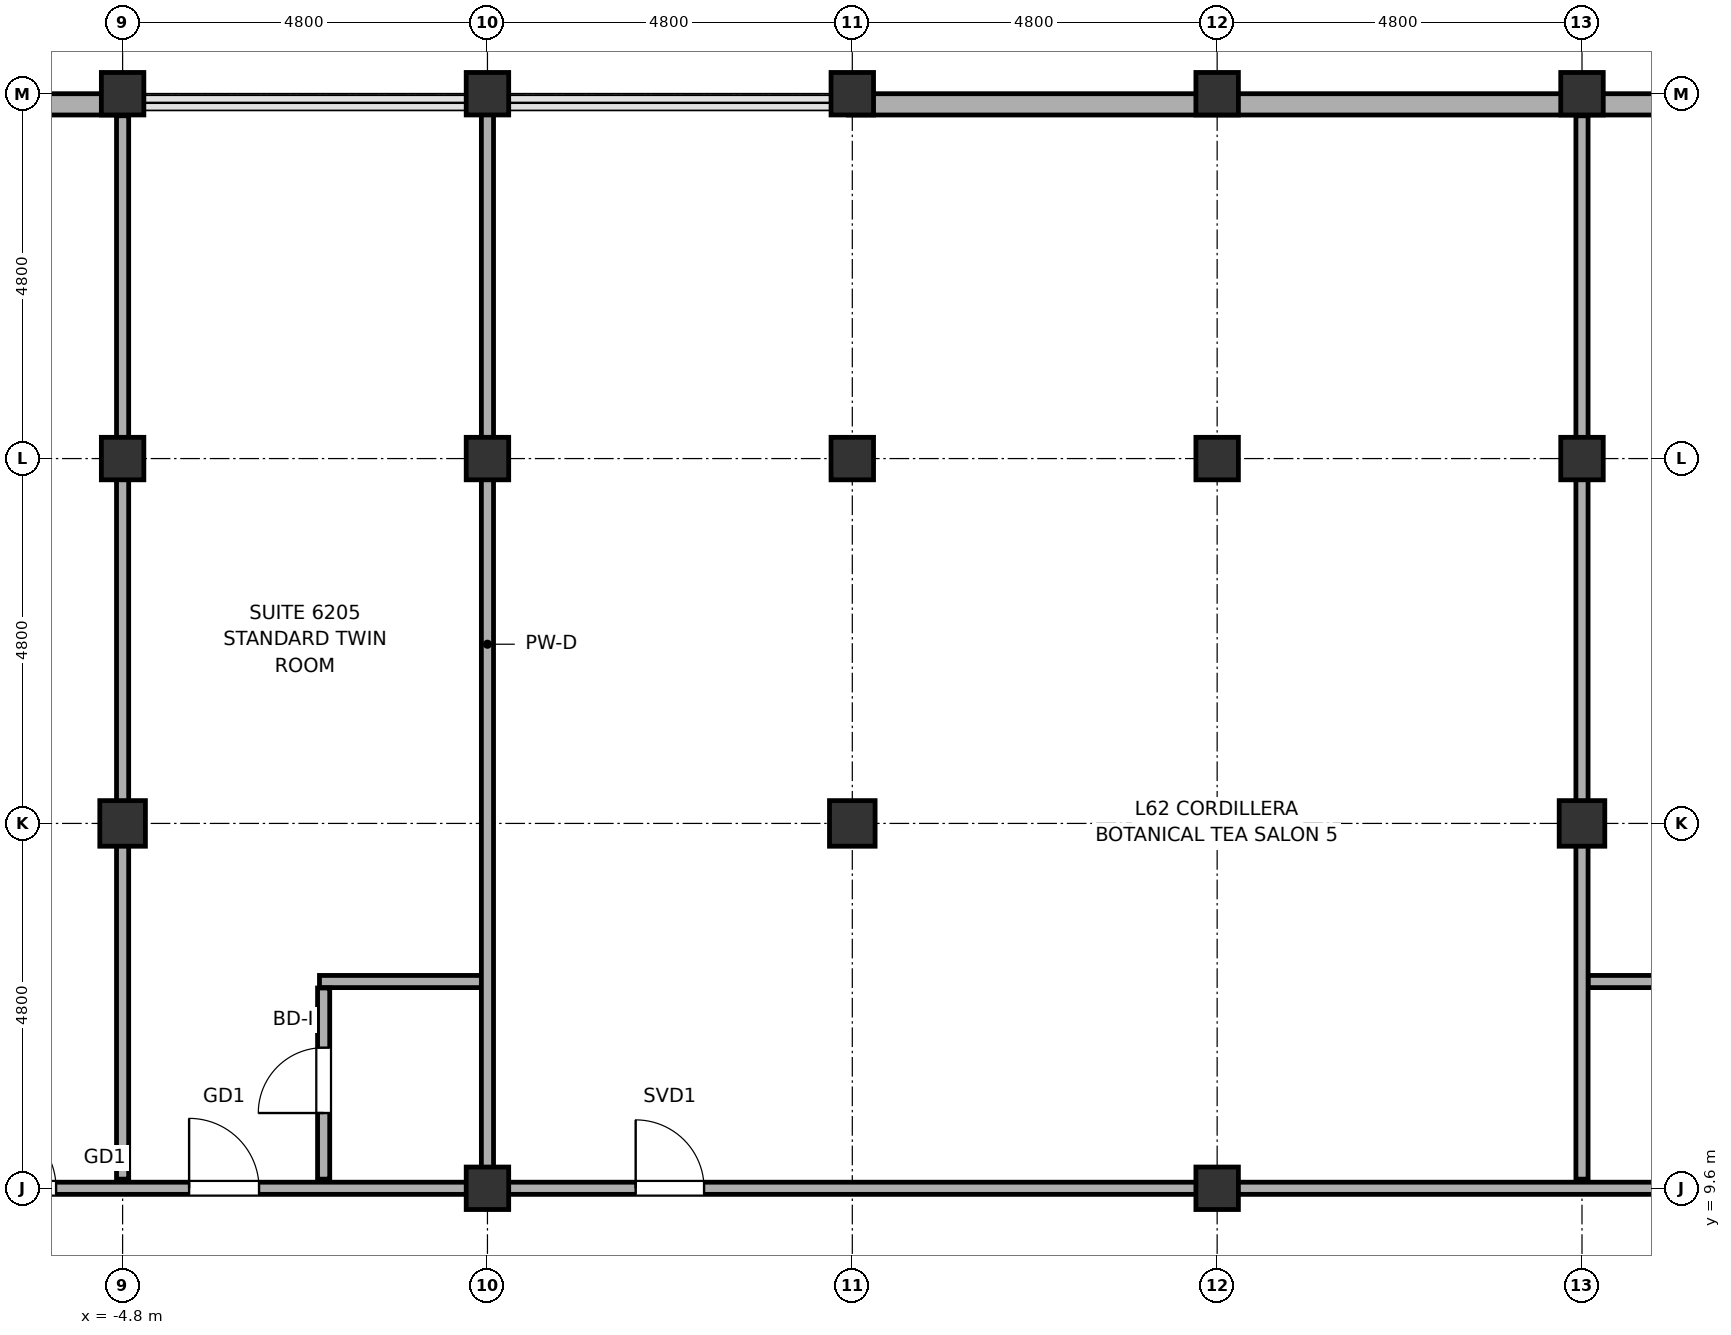
"""IFC4 building model, lengths in metres.
Left out: names, types, materials, properties, quantities, classifications, styles, units other than length and angle.
Written with IfcOpenShell. Run it as: python <this file> out.ifc"""

import sys

from ifc_helpers import new_model, si_unit, direction, frame, frame_2d, origin, origin_2d, place, context, subcontext, project, spatial, rectangle, hollow_rectangle, hollow_circle, extrude, element, fill, save


model = new_model("IFC4")
c1 = context("Model", 3, precision=1e-05, world=origin(), true_north=direction((0.0, 1.0)))
c2 = subcontext(c1, "Body", "Model", "MODEL_VIEW")
j1 = project(units=[si_unit("LENGTHUNIT", "METRE"), si_unit("PLANEANGLEUNIT", "RADIAN")], contexts=[c1])
p1 = place(None, origin())
s1 = spatial("IfcSite", under=j1, at=p1, CompositionType="ELEMENT")
p2 = place(p1, origin())
s2 = spatial("IfcBuilding", under=s1, at=p2, CompositionType="ELEMENT")
p3 = place(p2, frame((0.0, 0.0, 249.25)))
s3 = spatial("IfcBuildingStorey", under=s2, at=p3, CompositionType="ELEMENT", Elevation=249.25)
p4 = place(p3, frame((-4.8, 14.4, 0.0), z_axis=(0.0, 0.0, 1.0), x_axis=(1.0, 0.0, 0.0)))
e1 = element("IfcColumn", 1, at=p4, inside=s3, PredefinedType="COLUMN", context=c2, shape_type="SweptSolid", body=[
    extrude(hollow_rectangle(XDim=0.6, YDim=0.6, WallThickness=0.028, at=origin_2d()), origin(), (0.0, 0.0, 1.0), 3.85),
])
for number, where, z_axis, x_axis in (
    (2, (-4.8, 19.2, 0.0), (0.0, 0.0, 1.0), (1.0, 0.0, 0.0)),
    (3, (-4.8, 24.0, 0.0), (0.0, 0.0, 1.0), (1.0, 0.0, 0.0)),
    (4, (0.0, 9.6, 0.0), (0.0, 0.0, 1.0), (1.0, 0.0, 0.0)),
    (5, (0.0, 19.2, 0.0), (0.0, 0.0, 1.0), (1.0, 0.0, 0.0)),
    (6, (0.0, 24.0, 0.0), (0.0, 0.0, 1.0), (1.0, 0.0, 0.0)),
):
    element("IfcColumn", number, at=place(p3, frame(where, z_axis=z_axis, x_axis=x_axis)), inside=s3, PredefinedType="COLUMN", context=c2, shape_type="SweptSolid", body=[
        extrude(hollow_circle(Radius=0.28, WallThickness=0.025, at=origin_2d()), origin(), (0.0, 0.0, 1.0), 3.85),
    ])
p5 = place(p3, frame((4.8, 14.4, 0.0), z_axis=(0.0, 0.0, 1.0), x_axis=(1.0, 0.0, 0.0)))
e7 = element("IfcColumn", 7, at=p5, inside=s3, PredefinedType="COLUMN", context=c2, shape_type="SweptSolid", body=[
    extrude(hollow_rectangle(XDim=0.6, YDim=0.6, WallThickness=0.028, at=origin_2d()), origin(), (0.0, 0.0, 1.0), 3.85),
])
for number, where, z_axis, x_axis in (
    (8, (4.8, 19.2, 0.0), (0.0, 0.0, 1.0), (1.0, 0.0, 0.0)),
    (9, (4.8, 24.0, 0.0), (0.0, 0.0, 1.0), (1.0, 0.0, 0.0)),
    (10, (9.6, 9.6, 0.0), (0.0, 0.0, 1.0), (1.0, 0.0, 0.0)),
    (11, (9.6, 19.2, 0.0), (0.0, 0.0, 1.0), (1.0, 0.0, 0.0)),
    (12, (9.6, 24.0, 0.0), (0.0, 0.0, 1.0), (1.0, 0.0, 0.0)),
):
    element("IfcColumn", number, at=place(p3, frame(where, z_axis=z_axis, x_axis=x_axis)), inside=s3, PredefinedType="COLUMN", context=c2, shape_type="SweptSolid", body=[
        extrude(hollow_circle(Radius=0.28, WallThickness=0.025, at=origin_2d()), origin(), (0.0, 0.0, 1.0), 3.85),
    ])
p6 = place(p3, frame((14.4, 14.4, 0.0), z_axis=(0.0, 0.0, 1.0), x_axis=(1.0, 0.0, 0.0)))
e13 = element("IfcColumn", 13, at=p6, inside=s3, PredefinedType="COLUMN", context=c2, shape_type="SweptSolid", body=[
    extrude(hollow_rectangle(XDim=0.6, YDim=0.6, WallThickness=0.028, at=origin_2d()), origin(), (0.0, 0.0, 1.0), 3.85),
])
for number, where, z_axis, x_axis in (
    (14, (14.4, 19.2, 0.0), (0.0, 0.0, 1.0), (1.0, 0.0, 0.0)),
    (15, (14.4, 24.0, 0.0), (0.0, 0.0, 1.0), (1.0, 0.0, 0.0)),
):
    element("IfcColumn", number, at=place(p3, frame(where, z_axis=z_axis, x_axis=x_axis)), inside=s3, PredefinedType="COLUMN", context=c2, shape_type="SweptSolid", body=[
        extrude(hollow_circle(Radius=0.28, WallThickness=0.025, at=origin_2d()), origin(), (0.0, 0.0, 1.0), 3.85),
    ])
p7 = place(p3, frame((-30.0, 23.86, 0.0), z_axis=(0.0, 0.0, 1.0), x_axis=(1.0, 0.0, 0.0)))
e16 = element("IfcWall", 16, at=p7, inside=s3, PredefinedType="SOLIDWALL", context=c2, shape_type="SweptSolid", body=[
    extrude(rectangle(XDim=25.25, YDim=0.28, at=frame_2d((12.625, 0.0))), origin(), (0.0, 0.0, 1.0), 2.27),
])
p8 = place(p7, frame((7.8, 0.0, 0.75)))
e17 = element("IfcOpeningElement", 17, at=p8, cuts=e16, PredefinedType="OPENING", context=c2, shape_type="SweptSolid", body=[
    extrude(rectangle(XDim=1.2, YDim=1.15, at=frame_2d((0.6, 0.575))), frame((0.0, 0.155, 0.0), z_axis=(0.0, -1.0, 0.0), x_axis=(1.0, 0.0, 0.0)), (0.0, 0.0, 1.0), 0.31),
])
p9 = place(p7, frame((13.8, 0.0, 0.75)))
e18 = element("IfcOpeningElement", 18, at=p9, cuts=e16, PredefinedType="OPENING", context=c2, shape_type="SweptSolid", body=[
    extrude(rectangle(XDim=1.2, YDim=1.15, at=frame_2d((0.6, 0.575))), frame((0.0, 0.155, 0.0), z_axis=(0.0, -1.0, 0.0), x_axis=(1.0, 0.0, 0.0)), (0.0, 0.0, 1.0), 0.31),
])
p10 = place(p7, frame((17.4, 0.0, 0.75)))
e19 = element("IfcOpeningElement", 19, at=p10, cuts=e16, PredefinedType="OPENING", context=c2, shape_type="SweptSolid", body=[
    extrude(rectangle(XDim=1.2, YDim=1.15, at=frame_2d((0.6, 0.575))), frame((0.0, 0.155, 0.0), z_axis=(0.0, -1.0, 0.0), x_axis=(1.0, 0.0, 0.0)), (0.0, 0.0, 1.0), 0.31),
])
p11 = place(p7, frame((22.2, 0.0, 0.75)))
e20 = element("IfcOpeningElement", 20, at=p11, cuts=e16, PredefinedType="OPENING", context=c2, shape_type="SweptSolid", body=[
    extrude(rectangle(XDim=1.2, YDim=1.15, at=frame_2d((0.6, 0.575))), frame((0.0, 0.155, 0.0), z_axis=(0.0, -1.0, 0.0), x_axis=(1.0, 0.0, 0.0)), (0.0, 0.0, 1.0), 0.31),
])
p12 = place(p3, frame((4.75, 23.86, 0.0), z_axis=(0.0, 0.0, 1.0), x_axis=(1.0, 0.0, 0.0)))
e21 = element("IfcWall", 21, at=p12, inside=s3, PredefinedType="SOLIDWALL", context=c2, shape_type="SweptSolid", body=[
    extrude(rectangle(XDim=20.45, YDim=0.28, at=frame_2d((10.225, 0.0))), origin(), (0.0, 0.0, 1.0), 2.27),
])
p13 = place(p12, frame((11.45, 0.0, 0.75)))
e22 = element("IfcOpeningElement", 22, at=p13, cuts=e21, PredefinedType="OPENING", context=c2, shape_type="SweptSolid", body=[
    extrude(rectangle(XDim=1.2, YDim=1.15, at=frame_2d((0.6, 0.575))), frame((0.0, 0.155, 0.0), z_axis=(0.0, -1.0, 0.0), x_axis=(1.0, 0.0, 0.0)), (0.0, 0.0, 1.0), 0.31),
])
p14 = place(p3, frame((-23.92, 9.6, 0.0), z_axis=(0.0, 0.0, 1.0), x_axis=(1.0, 0.0, 0.0)))
e23 = element("IfcWall", 23, at=p14, inside=s3, PredefinedType="PARTITIONING", context=c2, shape_type="SweptSolid", body=[
    extrude(rectangle(XDim=47.84, YDim=0.16, at=frame_2d((23.92, 0.0))), origin(), (0.0, 0.0, 1.0), 2.27),
])
p15 = place(p14, frame((1.87, 0.0, 0.0)))
e24 = element("IfcOpeningElement", 24, at=p15, cuts=e23, PredefinedType="OPENING", context=c2, shape_type="SweptSolid", body=[
    extrude(rectangle(XDim=0.9, YDim=2.1, at=frame_2d((0.45, 1.05))), frame((0.0, 0.095, 0.0), z_axis=(0.0, -1.0, 0.0), x_axis=(1.0, 0.0, 0.0)), (0.0, 0.0, 1.0), 0.19),
])
p16 = place(p14, frame((45.07, 0.0, 0.0)))
e25 = element("IfcOpeningElement", 25, at=p16, cuts=e23, PredefinedType="OPENING", context=c2, shape_type="SweptSolid", body=[
    extrude(rectangle(XDim=0.9, YDim=2.1, at=frame_2d((0.45, 1.05))), frame((0.0, 0.095, 0.0), z_axis=(0.0, -1.0, 0.0), x_axis=(1.0, 0.0, 0.0)), (0.0, 0.0, 1.0), 0.19),
])
p17 = place(p14, frame((5.98, 0.0, 0.0)))
e26 = element("IfcOpeningElement", 26, at=p17, cuts=e23, PredefinedType="OPENING", context=c2, shape_type="SweptSolid", body=[
    extrude(rectangle(XDim=0.9, YDim=2.1, at=frame_2d((0.45, 1.05))), frame((0.0, 0.095, 0.0), z_axis=(0.0, -1.0, 0.0), x_axis=(1.0, 0.0, 0.0)), (0.0, 0.0, 1.0), 0.19),
])
p18 = place(p14, frame((7.87, 0.0, 0.0)))
e27 = element("IfcOpeningElement", 27, at=p18, cuts=e23, PredefinedType="OPENING", context=c2, shape_type="SweptSolid", body=[
    extrude(rectangle(XDim=0.9, YDim=2.1, at=frame_2d((0.45, 1.05))), frame((0.0, 0.095, 0.0), z_axis=(0.0, -1.0, 0.0), x_axis=(1.0, 0.0, 0.0)), (0.0, 0.0, 1.0), 0.19),
])
p19 = place(p14, frame((10.395, 0.0, 0.0)))
e28 = element("IfcOpeningElement", 28, at=p19, cuts=e23, PredefinedType="OPENING", context=c2, shape_type="SweptSolid", body=[
    extrude(rectangle(XDim=0.92, YDim=2.15, at=frame_2d((0.46, 1.075))), frame((0.0, 0.095, 0.0), z_axis=(0.0, -1.0, 0.0), x_axis=(1.0, 0.0, 0.0)), (0.0, 0.0, 1.0), 0.19),
])
p20 = place(p14, frame((17.325, 0.0, 0.0)))
e29 = element("IfcOpeningElement", 29, at=p20, cuts=e23, PredefinedType="OPENING", context=c2, shape_type="SweptSolid", body=[
    extrude(rectangle(XDim=0.92, YDim=2.15, at=frame_2d((0.46, 1.075))), frame((0.0, 0.095, 0.0), z_axis=(0.0, -1.0, 0.0), x_axis=(1.0, 0.0, 0.0)), (0.0, 0.0, 1.0), 0.19),
])
p21 = place(p14, frame((19.995, 0.0, 0.0)))
e30 = element("IfcOpeningElement", 30, at=p21, cuts=e23, PredefinedType="OPENING", context=c2, shape_type="SweptSolid", body=[
    extrude(rectangle(XDim=0.92, YDim=2.15, at=frame_2d((0.46, 1.075))), frame((0.0, 0.095, 0.0), z_axis=(0.0, -1.0, 0.0), x_axis=(1.0, 0.0, 0.0)), (0.0, 0.0, 1.0), 0.19),
])
p22 = place(p14, frame((25.87, 0.0, 0.0)))
e31 = element("IfcOpeningElement", 31, at=p22, cuts=e23, PredefinedType="OPENING", context=c2, shape_type="SweptSolid", body=[
    extrude(rectangle(XDim=0.9, YDim=2.1, at=frame_2d((0.45, 1.05))), frame((0.0, 0.095, 0.0), z_axis=(0.0, -1.0, 0.0), x_axis=(1.0, 0.0, 0.0)), (0.0, 0.0, 1.0), 0.19),
])
p23 = place(p14, frame((40.83, 0.0, 0.0)))
e32 = element("IfcOpeningElement", 32, at=p23, cuts=e23, PredefinedType="OPENING", context=c2, shape_type="SweptSolid", body=[
    extrude(rectangle(XDim=0.92, YDim=2.15, at=frame_2d((0.46, 1.075))), frame((0.0, 0.095, 0.0), z_axis=(0.0, -1.0, 0.0), x_axis=(1.0, 0.0, 0.0)), (0.0, 0.0, 1.0), 0.19),
])
p24 = place(p3, frame((-2.21, 12.32, 0.0), z_axis=(0.0, 0.0, 1.0), x_axis=(1.0, 0.0, 0.0)))
e33 = element("IfcWall", 33, at=p24, inside=s3, PredefinedType="PARTITIONING", context=c2, shape_type="SweptSolid", body=[
    extrude(rectangle(XDim=2.13, YDim=0.16, at=frame_2d((1.065, 0.0))), origin(), (0.0, 0.0, 1.0), 3.31),
])
p25 = place(p3, frame((14.48, 12.32, 0.0), z_axis=(0.0, 0.0, 1.0), x_axis=(1.0, 0.0, 0.0)))
e34 = element("IfcWall", 34, at=p25, inside=s3, PredefinedType="PARTITIONING", context=c2, shape_type="SweptSolid", body=[
    extrude(rectangle(XDim=2.13, YDim=0.16, at=frame_2d((1.065, 0.0))), origin(), (0.0, 0.0, 1.0), 3.12),
])
p26 = place(p3, frame((-4.8, 9.72, 0.0), z_axis=(0.0, 0.0, 1.0), x_axis=(0.0, 1.0, 0.0)))
e35 = element("IfcWall", 35, at=p26, inside=s3, PredefinedType="PARTITIONING", context=c2, shape_type="SweptSolid", body=[
    extrude(rectangle(XDim=13.99, YDim=0.16, at=frame_2d((6.995, 0.0))), origin(), (0.0, 0.0, 1.0), 2.27),
])
p27 = place(p3, frame((-2.155, 9.72, 0.0), z_axis=(0.0, 0.0, 1.0), x_axis=(0.0, 1.0, 0.0)))
e36 = element("IfcWall", 36, at=p27, inside=s3, PredefinedType="PARTITIONING", context=c2, shape_type="SweptSolid", body=[
    extrude(rectangle(XDim=2.515, YDim=0.16, at=frame_2d((1.258, 0.0))), origin(), (0.0, 0.0, 1.0), 2.27),
])
p28 = place(p27, frame((0.87, 0.0, 0.0)))
e37 = element("IfcOpeningElement", 37, at=p28, cuts=e36, PredefinedType="OPENING", context=c2, shape_type="SweptSolid", body=[
    extrude(rectangle(XDim=0.86, YDim=2.1, at=frame_2d((0.43, 1.05))), frame((0.0, 0.095, 0.0), z_axis=(0.0, -1.0, 0.0), x_axis=(1.0, 0.0, 0.0)), (0.0, 0.0, 1.0), 0.19),
])
p29 = place(p3, frame((0.0, 9.72, 0.0), z_axis=(0.0, 0.0, 1.0), x_axis=(0.0, 1.0, 0.0)))
e38 = element("IfcWall", 38, at=p29, inside=s3, PredefinedType="PARTITIONING", context=c2, shape_type="SweptSolid", body=[
    extrude(rectangle(XDim=14.075, YDim=0.16, at=frame_2d((7.038, 0.0))), origin(), (0.0, 0.0, 1.0), 2.27),
])
p30 = place(p3, frame((14.4, 9.72, 0.0), z_axis=(0.0, 0.0, 1.0), x_axis=(0.0, 1.0, 0.0)))
e39 = element("IfcWall", 39, at=p30, inside=s3, PredefinedType="PARTITIONING", context=c2, shape_type="SweptSolid", body=[
    extrude(rectangle(XDim=13.99, YDim=0.16, at=frame_2d((6.995, 0.0))), origin(), (0.0, 0.0, 1.0), 2.27),
])
p31 = place(p20, origin())
e40 = element("IfcDoor", 40, at=p31, inside=s3, OperationType="SINGLE_SWING_RIGHT", PredefinedType="DOOR", context=c2, shape_type="SweptSolid", body=[
    extrude(rectangle(XDim=0.92, YDim=2.15, at=frame_2d((0.46, 1.075))), frame((0.0, 0.025, 0.0), z_axis=(0.0, -1.0, 0.0), x_axis=(1.0, 0.0, 0.0)), (0.0, 0.0, 1.0), 0.05),
])
fill(e29, e40)
p32 = place(p21, origin())
e41 = element("IfcDoor", 41, at=p32, inside=s3, OperationType="SINGLE_SWING_RIGHT", PredefinedType="DOOR", context=c2, shape_type="SweptSolid", body=[
    extrude(rectangle(XDim=0.92, YDim=2.15, at=frame_2d((0.46, 1.075))), frame((0.0, 0.025, 0.0), z_axis=(0.0, -1.0, 0.0), x_axis=(1.0, 0.0, 0.0)), (0.0, 0.0, 1.0), 0.05),
])
fill(e30, e41)
p33 = place(p28, origin())
e42 = element("IfcDoor", 42, at=p33, inside=s3, OperationType="SINGLE_SWING_RIGHT", PredefinedType="DOOR", context=c2, shape_type="SweptSolid", body=[
    extrude(rectangle(XDim=0.86, YDim=2.1, at=frame_2d((0.43, 1.05))), frame((0.0, 0.025, 0.0), z_axis=(0.0, -1.0, 0.0), x_axis=(1.0, 0.0, 0.0)), (0.0, 0.0, 1.0), 0.05),
])
fill(e37, e42)
p34 = place(p22, origin())
e43 = element("IfcDoor", 43, at=p34, inside=s3, OperationType="SINGLE_SWING_LEFT", PredefinedType="DOOR", context=c2, shape_type="SweptSolid", body=[
    extrude(rectangle(XDim=0.9, YDim=2.1, at=frame_2d((0.45, 1.05))), frame((0.0, 0.025, 0.0), z_axis=(0.0, -1.0, 0.0), x_axis=(1.0, 0.0, 0.0)), (0.0, 0.0, 1.0), 0.05),
])
fill(e31, e43)
save(model, sys.argv[1])
